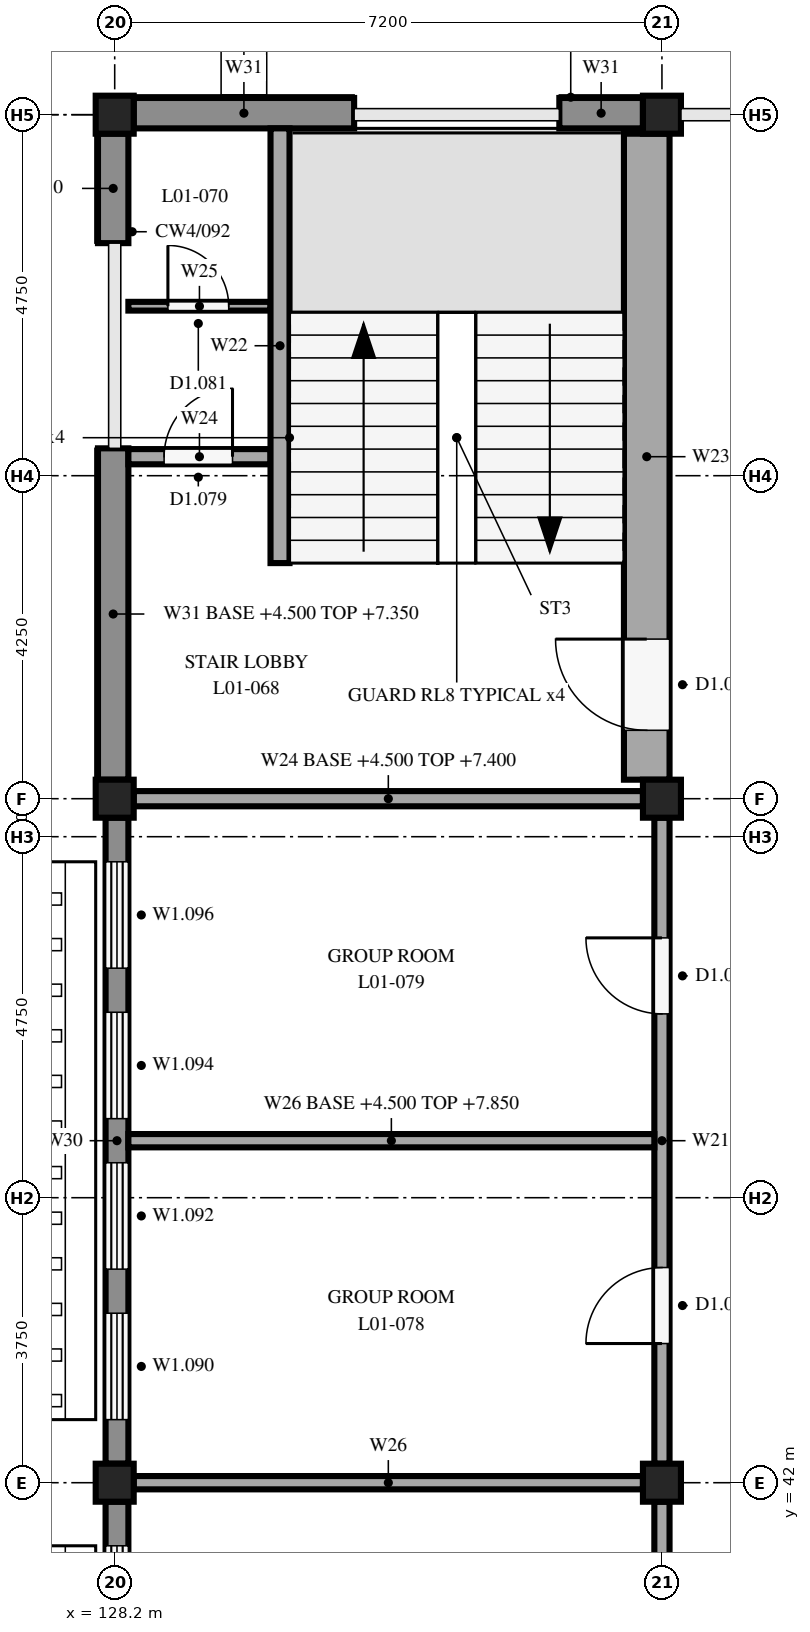
"""IFC4 building model, lengths in metres.
Left out: names, types, materials, properties, quantities, classifications, styles, units other than length and angle.
Written with IfcOpenShell. Run it as: python <this file> out.ifc"""

import sys

from ifc_helpers import new_model, si_unit, direction, frame, frame_2d, origin, origin_2d, place, context, subcontext, project, spatial, rectangle, extrude, element, fill, save


model = new_model("IFC4")
c1 = context("Model", 3, precision=1e-05, world=origin(), true_north=direction((0.0, 1.0)))
c2 = subcontext(c1, "Body", "Model", "MODEL_VIEW")
j1 = project(units=[si_unit("LENGTHUNIT", "METRE"), si_unit("PLANEANGLEUNIT", "RADIAN")], contexts=[c1])
p1 = place(None, origin())
s1 = spatial("IfcSite", under=j1, at=p1, CompositionType="ELEMENT")
p2 = place(p1, origin())
s2 = spatial("IfcBuilding", under=s1, at=p2, CompositionType="ELEMENT")
p3 = place(p2, frame((0.0, 0.0, 4.5)))
s3 = spatial("IfcBuildingStorey", under=s2, at=p3, CompositionType="ELEMENT", Elevation=4.5)
for number, where, z_axis, x_axis in (
    (1, (128.2, 42.0, 0.0), (0.0, 0.0, 1.0), (1.0, 0.0, 0.0)),
    (2, (128.2, 51.0, 0.0), (0.0, 0.0, 1.0), (1.0, 0.0, 0.0)),
    (3, (128.2, 60.0, 0.0), (0.0, 0.0, 1.0), (1.0, 0.0, 0.0)),
    (4, (135.4, 42.0, 0.0), (0.0, 0.0, 1.0), (1.0, 0.0, 0.0)),
    (5, (135.4, 51.0, 0.0), (0.0, 0.0, 1.0), (1.0, 0.0, 0.0)),
    (6, (135.4, 60.0, 0.0), (0.0, 0.0, 1.0), (1.0, 0.0, 0.0)),
):
    element("IfcColumn", number, at=place(p3, frame(where, z_axis=z_axis, x_axis=x_axis)), inside=s3, PredefinedType="COLUMN", context=c2, shape_type="SweptSolid", body=[
        extrude(rectangle(XDim=0.5, YDim=0.5, at=origin_2d()), origin(), (0.0, 0.0, 1.0), 3.35),
    ])
p4 = place(p3, frame((128.23, 33.25, 0.0), z_axis=(0.0, 0.0, 1.0), x_axis=(0.0, 1.0, 0.0)))
e7 = element("IfcWall", 7, at=p4, inside=s3, PredefinedType="STANDARD", context=c2, shape_type="SweptSolid", body=[
    extrude(rectangle(XDim=8.5, YDim=0.3, at=frame_2d((4.25, 0.0))), origin(), (0.0, 0.0, 1.0), 2.85),
])
p5 = place(p4, frame((0.58, 0.0, 0.6)))
e8 = element("IfcOpeningElement", 8, at=p5, cuts=e7, PredefinedType="OPENING", context=c2, shape_type="SweptSolid", body=[
    extrude(rectangle(XDim=1.4, YDim=2.2, at=frame_2d((0.7, 1.1))), frame((0.0, 0.16, 0.0), z_axis=(0.0, -1.0, 0.0), x_axis=(1.0, 0.0, 0.0)), (0.0, 0.0, 1.0), 0.32),
])
p6 = place(p4, frame((2.56, 0.0, 0.6)))
e9 = element("IfcOpeningElement", 9, at=p6, cuts=e7, PredefinedType="OPENING", context=c2, shape_type="SweptSolid", body=[
    extrude(rectangle(XDim=1.4, YDim=2.2, at=frame_2d((0.7, 1.1))), frame((0.0, 0.16, 0.0), z_axis=(0.0, -1.0, 0.0), x_axis=(1.0, 0.0, 0.0)), (0.0, 0.0, 1.0), 0.32),
])
p7 = place(p4, frame((4.54, 0.0, 0.6)))
e10 = element("IfcOpeningElement", 10, at=p7, cuts=e7, PredefinedType="OPENING", context=c2, shape_type="SweptSolid", body=[
    extrude(rectangle(XDim=1.4, YDim=2.2, at=frame_2d((0.7, 1.1))), frame((0.0, 0.16, 0.0), z_axis=(0.0, -1.0, 0.0), x_axis=(1.0, 0.0, 0.0)), (0.0, 0.0, 1.0), 0.32),
])
p8 = place(p4, frame((6.52, 0.0, 0.6)))
e11 = element("IfcOpeningElement", 11, at=p8, cuts=e7, PredefinedType="OPENING", context=c2, shape_type="SweptSolid", body=[
    extrude(rectangle(XDim=1.4, YDim=2.2, at=frame_2d((0.7, 1.1))), frame((0.0, 0.16, 0.0), z_axis=(0.0, -1.0, 0.0), x_axis=(1.0, 0.0, 0.0)), (0.0, 0.0, 1.0), 0.32),
])
p9 = place(p3, frame((128.23, 42.25, 0.0), z_axis=(0.0, 0.0, 1.0), x_axis=(0.0, 1.0, 0.0)))
e12 = element("IfcWall", 12, at=p9, inside=s3, PredefinedType="STANDARD", context=c2, shape_type="SweptSolid", body=[
    extrude(rectangle(XDim=8.5, YDim=0.3, at=frame_2d((4.25, 0.0))), origin(), (0.0, 0.0, 1.0), 2.85),
])
p10 = place(p9, frame((0.58, 0.0, 0.6)))
e13 = element("IfcOpeningElement", 13, at=p10, cuts=e12, PredefinedType="OPENING", context=c2, shape_type="SweptSolid", body=[
    extrude(rectangle(XDim=1.4, YDim=2.2, at=frame_2d((0.7, 1.1))), frame((0.0, 0.16, 0.0), z_axis=(0.0, -1.0, 0.0), x_axis=(1.0, 0.0, 0.0)), (0.0, 0.0, 1.0), 0.32),
])
p11 = place(p9, frame((2.56, 0.0, 0.6)))
e14 = element("IfcOpeningElement", 14, at=p11, cuts=e12, PredefinedType="OPENING", context=c2, shape_type="SweptSolid", body=[
    extrude(rectangle(XDim=1.4, YDim=2.2, at=frame_2d((0.7, 1.1))), frame((0.0, 0.16, 0.0), z_axis=(0.0, -1.0, 0.0), x_axis=(1.0, 0.0, 0.0)), (0.0, 0.0, 1.0), 0.32),
])
p12 = place(p9, frame((4.54, 0.0, 0.6)))
e15 = element("IfcOpeningElement", 15, at=p12, cuts=e12, PredefinedType="OPENING", context=c2, shape_type="SweptSolid", body=[
    extrude(rectangle(XDim=1.4, YDim=2.2, at=frame_2d((0.7, 1.1))), frame((0.0, 0.16, 0.0), z_axis=(0.0, -1.0, 0.0), x_axis=(1.0, 0.0, 0.0)), (0.0, 0.0, 1.0), 0.32),
])
p13 = place(p9, frame((6.52, 0.0, 0.6)))
e16 = element("IfcOpeningElement", 16, at=p13, cuts=e12, PredefinedType="OPENING", context=c2, shape_type="SweptSolid", body=[
    extrude(rectangle(XDim=1.4, YDim=2.2, at=frame_2d((0.7, 1.1))), frame((0.0, 0.16, 0.0), z_axis=(0.0, -1.0, 0.0), x_axis=(1.0, 0.0, 0.0)), (0.0, 0.0, 1.0), 0.32),
])
p14 = place(p3, frame((128.18, 51.25, 0.0), z_axis=(0.0, 0.0, 1.0), x_axis=(0.0, 1.0, 0.0)))
e17 = element("IfcWall", 17, at=p14, inside=s3, PredefinedType="STANDARD", context=c2, shape_type="SweptSolid", body=[
    extrude(rectangle(XDim=4.36, YDim=0.4, at=frame_2d((2.18, 0.0))), origin(), (0.0, 0.0, 1.0), 2.85),
])
p15 = place(p3, frame((128.18, 58.31, 0.0), z_axis=(0.0, 0.0, 1.0), x_axis=(0.0, 1.0, 0.0)))
e18 = element("IfcWall", 18, at=p15, inside=s3, PredefinedType="STANDARD", context=c2, shape_type="SweptSolid", body=[
    extrude(rectangle(XDim=1.44, YDim=0.4, at=frame_2d((0.72, 0.0))), origin(), (0.0, 0.0, 1.0), 2.85),
])
p16 = place(p3, frame((128.45, 60.02, 0.0), z_axis=(0.0, 0.0, 1.0), x_axis=(1.0, 0.0, 0.0)))
e19 = element("IfcWall", 19, at=p16, inside=s3, PredefinedType="STANDARD", context=c2, shape_type="SweptSolid", body=[
    extrude(rectangle(XDim=2.9, YDim=0.4, at=frame_2d((1.45, 0.0))), origin(), (0.0, 0.0, 1.0), 2.9),
])
p17 = place(p3, frame((134.05, 60.02, 0.0), z_axis=(0.0, 0.0, 1.0), x_axis=(1.0, 0.0, 0.0)))
e20 = element("IfcWall", 20, at=p17, inside=s3, PredefinedType="STANDARD", context=c2, shape_type="SweptSolid", body=[
    extrude(rectangle(XDim=1.1, YDim=0.4, at=frame_2d((0.55, 0.0))), origin(), (0.0, 0.0, 1.0), 2.9),
])
p18 = place(p3, frame((130.375, 54.1, 0.0), z_axis=(0.0, 0.0, 1.0), x_axis=(0.0, 1.0, 0.0)))
e21 = element("IfcWall", 21, at=p18, inside=s3, PredefinedType="SOLIDWALL", context=c2, shape_type="SweptSolid", body=[
    extrude(rectangle(XDim=5.72, YDim=0.25, at=frame_2d((2.86, 0.0))), origin(), (0.0, 0.0, 1.0), 3.35),
])
p19 = place(p3, frame((135.2, 51.25, 0.0), z_axis=(0.0, 0.0, 1.0), x_axis=(0.0, 1.0, 0.0)))
e22 = element("IfcWall", 22, at=p19, inside=s3, PredefinedType="SOLIDWALL", context=c2, shape_type="SweptSolid", body=[
    extrude(rectangle(XDim=8.5, YDim=0.6, at=frame_2d((4.25, 0.0))), origin(), (0.0, 0.0, 1.0), 3.35),
])
p20 = place(p19, frame((0.65, 0.0, 0.0)))
e23 = element("IfcOpeningElement", 23, at=p20, cuts=e22, PredefinedType="OPENING", context=c2, shape_type="SweptSolid", body=[
    extrude(rectangle(XDim=1.2, YDim=2.1, at=frame_2d((0.6, 1.05))), frame((0.0, 0.31, 0.0), z_axis=(0.0, -1.0, 0.0), x_axis=(1.0, 0.0, 0.0)), (0.0, 0.0, 1.0), 0.62),
])
p21 = place(p3, frame((128.38, 55.5, 0.0), z_axis=(0.0, 0.0, 1.0), x_axis=(1.0, 0.0, 0.0)))
e24 = element("IfcWall", 24, at=p21, inside=s3, PredefinedType="SOLIDWALL", context=c2, shape_type="SweptSolid", body=[
    extrude(rectangle(XDim=1.87, YDim=0.2, at=frame_2d((0.935, 0.0))), origin(), (0.0, 0.0, 1.0), 3.35),
])
p22 = place(p21, frame((0.47, 0.0, 0.0)))
e25 = element("IfcOpeningElement", 25, at=p22, cuts=e24, PredefinedType="OPENING", context=c2, shape_type="SweptSolid", body=[
    extrude(rectangle(XDim=0.9, YDim=2.1, at=frame_2d((0.45, 1.05))), frame((0.0, 0.11, 0.0), z_axis=(0.0, -1.0, 0.0), x_axis=(1.0, 0.0, 0.0)), (0.0, 0.0, 1.0), 0.22),
])
p23 = place(p3, frame((128.38, 57.48, 0.0), z_axis=(0.0, 0.0, 1.0), x_axis=(1.0, 0.0, 0.0)))
e26 = element("IfcWall", 26, at=p23, inside=s3, PredefinedType="PARTITIONING", context=c2, shape_type="SweptSolid", body=[
    extrude(rectangle(XDim=1.87, YDim=0.115, at=frame_2d((0.935, 0.0))), origin(), (0.0, 0.0, 1.0), 3.35),
])
p24 = place(p23, frame((0.52, 0.0, 0.0)))
e27 = element("IfcOpeningElement", 27, at=p24, cuts=e26, PredefinedType="OPENING", context=c2, shape_type="SweptSolid", body=[
    extrude(rectangle(XDim=0.8, YDim=2.1, at=frame_2d((0.4, 1.05))), frame((0.0, 0.067, 0.0), z_axis=(0.0, -1.0, 0.0), x_axis=(1.0, 0.0, 0.0)), (0.0, 0.0, 1.0), 0.135),
])
p25 = place(p3, frame((128.45, 51.0, 0.0), z_axis=(0.0, 0.0, 1.0), x_axis=(1.0, 0.0, 0.0)))
e28 = element("IfcWall", 28, at=p25, inside=s3, PredefinedType="SOLIDWALL", context=c2, shape_type="SweptSolid", body=[
    extrude(rectangle(XDim=6.7, YDim=0.2, at=frame_2d((3.35, 0.0))), origin(), (0.0, 0.0, 1.0), 2.9),
])
p26 = place(p3, frame((135.4, 33.25, 0.0), z_axis=(0.0, 0.0, 1.0), x_axis=(0.0, 1.0, 0.0)))
e29 = element("IfcWall", 29, at=p26, inside=s3, PredefinedType="PARTITIONING", context=c2, shape_type="SweptSolid", body=[
    extrude(rectangle(XDim=8.5, YDim=0.2, at=frame_2d((4.25, 0.0))), origin(), (0.0, 0.0, 1.0), 2.9),
])
p27 = place(p26, frame((3.75, 0.0, 0.0)))
e30 = element("IfcOpeningElement", 30, at=p27, cuts=e29, PredefinedType="OPENING", context=c2, shape_type="SweptSolid", body=[
    extrude(rectangle(XDim=1.0, YDim=2.1, at=frame_2d((0.5, 1.05))), frame((0.0, 0.11, 0.0), z_axis=(0.0, -1.0, 0.0), x_axis=(1.0, 0.0, 0.0)), (0.0, 0.0, 1.0), 0.22),
])
p28 = place(p3, frame((135.4, 42.25, 0.0), z_axis=(0.0, 0.0, 1.0), x_axis=(0.0, 1.0, 0.0)))
e31 = element("IfcWall", 31, at=p28, inside=s3, PredefinedType="PARTITIONING", context=c2, shape_type="SweptSolid", body=[
    extrude(rectangle(XDim=8.5, YDim=0.2, at=frame_2d((4.25, 0.0))), origin(), (0.0, 0.0, 1.0), 2.9),
])
p29 = place(p28, frame((1.581, 0.0, 0.0)))
e32 = element("IfcOpeningElement", 32, at=p29, cuts=e31, PredefinedType="OPENING", context=c2, shape_type="SweptSolid", body=[
    extrude(rectangle(XDim=1.0, YDim=2.1, at=frame_2d((0.5, 1.05))), frame((0.0, 0.11, 0.0), z_axis=(0.0, -1.0, 0.0), x_axis=(1.0, 0.0, 0.0)), (0.0, 0.0, 1.0), 0.22),
])
p30 = place(p28, frame((5.919, 0.0, 0.0)))
e33 = element("IfcOpeningElement", 33, at=p30, cuts=e31, PredefinedType="OPENING", context=c2, shape_type="SweptSolid", body=[
    extrude(rectangle(XDim=1.0, YDim=2.1, at=frame_2d((0.5, 1.05))), frame((0.0, 0.11, 0.0), z_axis=(0.0, -1.0, 0.0), x_axis=(1.0, 0.0, 0.0)), (0.0, 0.0, 1.0), 0.22),
])
p31 = place(p3, frame((128.45, 42.0, 0.0), z_axis=(0.0, 0.0, 1.0), x_axis=(1.0, 0.0, 0.0)))
e34 = element("IfcWall", 34, at=p31, inside=s3, PredefinedType="PARTITIONING", context=c2, shape_type="SweptSolid", body=[
    extrude(rectangle(XDim=6.7, YDim=0.175, at=frame_2d((3.35, 0.0))), origin(), (0.0, 0.0, 1.0), 2.9),
])
p32 = place(p3, frame((128.38, 46.5, 0.0), z_axis=(0.0, 0.0, 1.0), x_axis=(1.0, 0.0, 0.0)))
e35 = element("IfcWall", 35, at=p32, inside=s3, PredefinedType="PARTITIONING", context=c2, shape_type="SweptSolid", body=[
    extrude(rectangle(XDim=6.92, YDim=0.175, at=frame_2d((3.46, 0.0))), origin(), (0.0, 0.0, 1.0), 3.35),
])
p33 = place(p8, origin())
e36 = element("IfcWindow", 36, at=p33, inside=s3, PartitioningType="DOUBLE_PANEL_VERTICAL", PredefinedType="WINDOW", context=c2, shape_type="SweptSolid", body=[
    extrude(rectangle(XDim=1.4, YDim=2.2, at=frame_2d((0.7, 1.1))), frame((0.0, 0.03, 0.0), z_axis=(0.0, -1.0, 0.0), x_axis=(1.0, 0.0, 0.0)), (0.0, 0.0, 1.0), 0.06),
])
fill(e11, e36)
p34 = place(p10, origin())
e37 = element("IfcWindow", 37, at=p34, inside=s3, PartitioningType="DOUBLE_PANEL_VERTICAL", PredefinedType="WINDOW", context=c2, shape_type="SweptSolid", body=[
    extrude(rectangle(XDim=1.4, YDim=2.2, at=frame_2d((0.7, 1.1))), frame((0.0, 0.03, 0.0), z_axis=(0.0, -1.0, 0.0), x_axis=(1.0, 0.0, 0.0)), (0.0, 0.0, 1.0), 0.06),
])
fill(e13, e37)
p35 = place(p11, origin())
e38 = element("IfcWindow", 38, at=p35, inside=s3, PartitioningType="DOUBLE_PANEL_VERTICAL", PredefinedType="WINDOW", context=c2, shape_type="SweptSolid", body=[
    extrude(rectangle(XDim=1.4, YDim=2.2, at=frame_2d((0.7, 1.1))), frame((0.0, 0.03, 0.0), z_axis=(0.0, -1.0, 0.0), x_axis=(1.0, 0.0, 0.0)), (0.0, 0.0, 1.0), 0.06),
])
fill(e14, e38)
p36 = place(p12, origin())
e39 = element("IfcWindow", 39, at=p36, inside=s3, PartitioningType="DOUBLE_PANEL_VERTICAL", PredefinedType="WINDOW", context=c2, shape_type="SweptSolid", body=[
    extrude(rectangle(XDim=1.4, YDim=2.2, at=frame_2d((0.7, 1.1))), frame((0.0, 0.03, 0.0), z_axis=(0.0, -1.0, 0.0), x_axis=(1.0, 0.0, 0.0)), (0.0, 0.0, 1.0), 0.06),
])
fill(e15, e39)
p37 = place(p13, origin())
e40 = element("IfcWindow", 40, at=p37, inside=s3, PartitioningType="DOUBLE_PANEL_VERTICAL", PredefinedType="WINDOW", context=c2, shape_type="SweptSolid", body=[
    extrude(rectangle(XDim=1.4, YDim=2.2, at=frame_2d((0.7, 1.1))), frame((0.0, 0.03, 0.0), z_axis=(0.0, -1.0, 0.0), x_axis=(1.0, 0.0, 0.0)), (0.0, 0.0, 1.0), 0.06),
])
fill(e16, e40)
p38 = place(p20, origin())
e41 = element("IfcDoor", 41, at=p38, inside=s3, OperationType="SINGLE_SWING_RIGHT", PredefinedType="DOOR", context=c2, shape_type="SweptSolid", body=[
    extrude(rectangle(XDim=1.2, YDim=2.1, at=frame_2d((0.6, 1.05))), frame((0.0, 0.025, 0.0), z_axis=(0.0, -1.0, 0.0), x_axis=(1.0, 0.0, 0.0)), (0.0, 0.0, 1.0), 0.05),
])
fill(e23, e41)
p39 = place(p22, origin())
e42 = element("IfcDoor", 42, at=p39, inside=s3, OperationType="SINGLE_SWING_RIGHT", PredefinedType="DOOR", context=c2, shape_type="SweptSolid", body=[
    extrude(rectangle(XDim=0.9, YDim=2.1, at=frame_2d((0.45, 1.05))), frame((0.0, 0.025, 0.0), z_axis=(0.0, -1.0, 0.0), x_axis=(1.0, 0.0, 0.0)), (0.0, 0.0, 1.0), 0.05),
])
fill(e25, e42)
p40 = place(p24, origin())
e43 = element("IfcDoor", 43, at=p40, inside=s3, OperationType="SINGLE_SWING_LEFT", PredefinedType="DOOR", context=c2, shape_type="SweptSolid", body=[
    extrude(rectangle(XDim=0.8, YDim=2.1, at=frame_2d((0.4, 1.05))), frame((0.0, 0.025, 0.0), z_axis=(0.0, -1.0, 0.0), x_axis=(1.0, 0.0, 0.0)), (0.0, 0.0, 1.0), 0.05),
])
fill(e27, e43)
p41 = place(p29, origin())
e44 = element("IfcDoor", 44, at=p41, inside=s3, OperationType="SINGLE_SWING_LEFT", PredefinedType="DOOR", context=c2, shape_type="SweptSolid", body=[
    extrude(rectangle(XDim=1.0, YDim=2.1, at=frame_2d((0.5, 1.05))), frame((0.0, 0.025, 0.0), z_axis=(0.0, -1.0, 0.0), x_axis=(1.0, 0.0, 0.0)), (0.0, 0.0, 1.0), 0.05),
])
fill(e32, e44)
p42 = place(p30, origin())
e45 = element("IfcDoor", 45, at=p42, inside=s3, OperationType="SINGLE_SWING_RIGHT", PredefinedType="DOOR", context=c2, shape_type="SweptSolid", body=[
    extrude(rectangle(XDim=1.0, YDim=2.1, at=frame_2d((0.5, 1.05))), frame((0.0, 0.025, 0.0), z_axis=(0.0, -1.0, 0.0), x_axis=(1.0, 0.0, 0.0)), (0.0, 0.0, 1.0), 0.05),
])
fill(e33, e45)
save(model, sys.argv[1])
